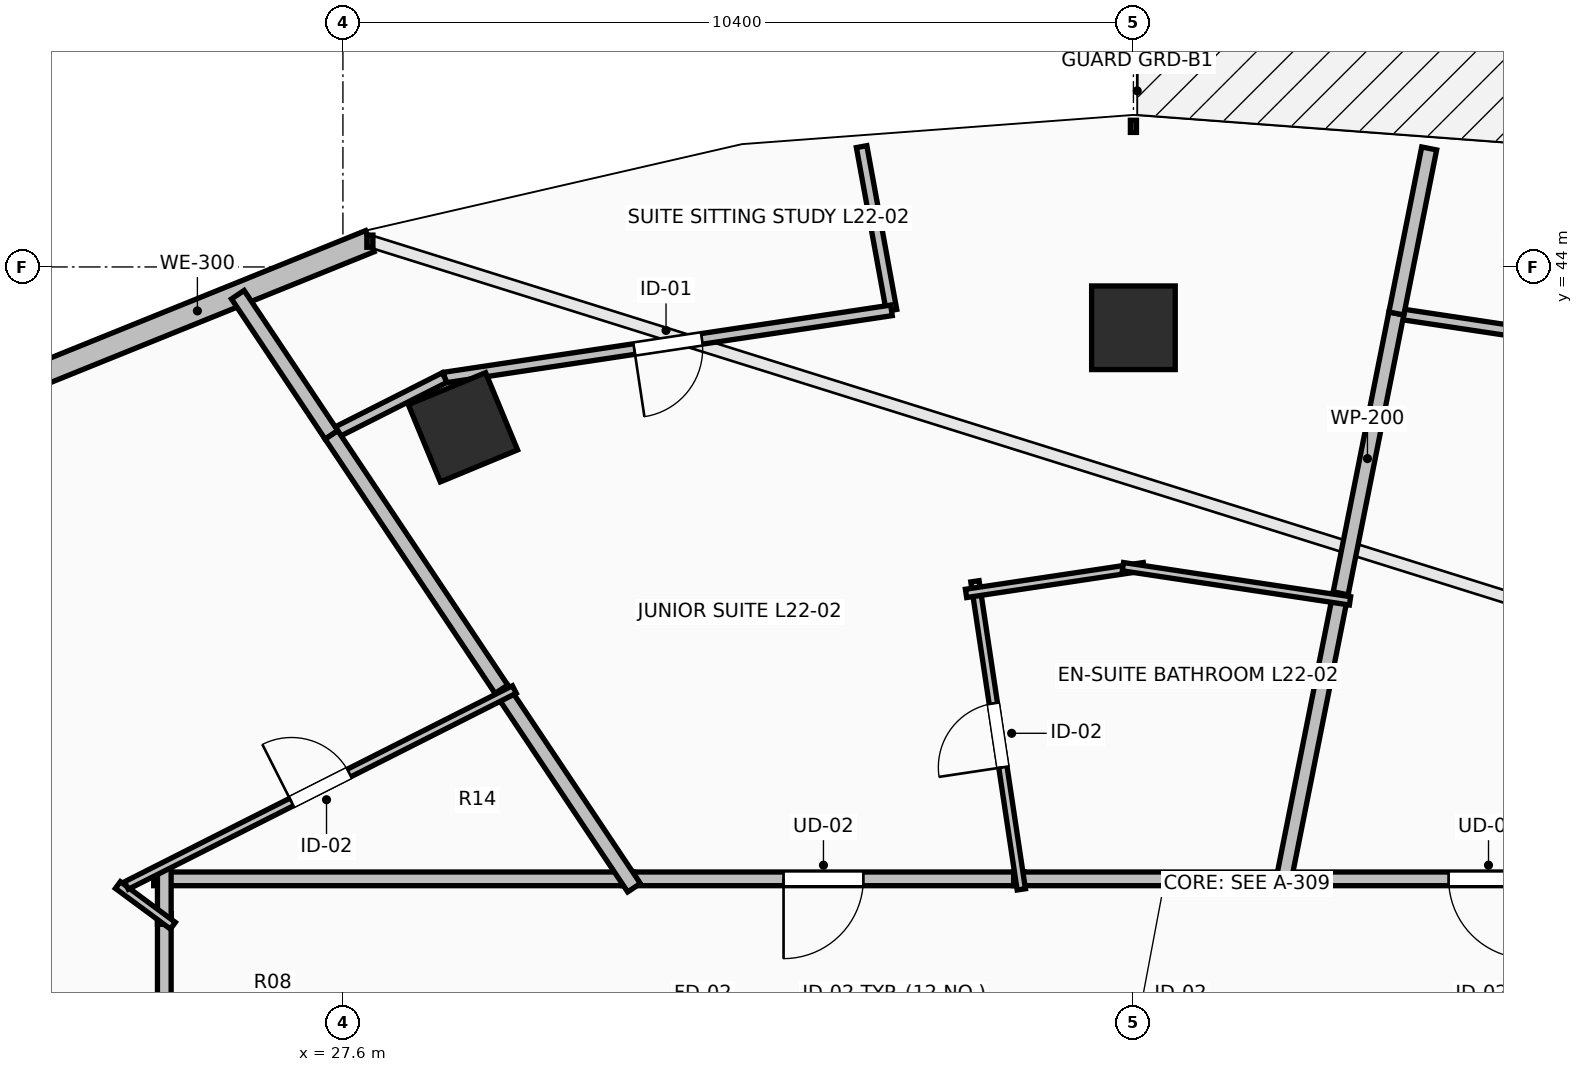
"""IFC4 building model, lengths in metres.
Left out: names, types, materials, properties, quantities, classifications, styles, units other than length and angle.
Written with IfcOpenShell. Run it as: python <this file> out.ifc"""

import sys

from ifc_helpers import new_model, si_unit, direction, frame, frame_2d, origin, origin_2d, place, context, subcontext, project, spatial, rectangle, extrude, element, fill, save


model = new_model("IFC4")
c1 = context("Model", 3, precision=1e-05, world=origin(), true_north=direction((0.0, 1.0)))
c2 = subcontext(c1, "Body", "Model", "MODEL_VIEW")
j1 = project(units=[si_unit("LENGTHUNIT", "METRE"), si_unit("PLANEANGLEUNIT", "RADIAN")], contexts=[c1])
p1 = place(None, origin())
s1 = spatial("IfcSite", under=j1, at=p1, CompositionType="ELEMENT")
p2 = place(p1, origin())
s2 = spatial("IfcBuilding", under=s1, at=p2, CompositionType="ELEMENT")
p3 = place(p2, frame((0.0, 0.0, 85.8)))
s3 = spatial("IfcBuildingStorey", under=s2, at=p3, CompositionType="ELEMENT", Elevation=85.8)
for number, where, z_axis, x_axis in (
    (1, (38.0, 43.2, 0.0), (0.0, 0.0, 1.0), (0.0, 1.0, 0.0)),
    (2, (29.179, 41.891, 0.0), (0.0, 0.0, 1.0), (-0.383, 0.924, 0.0)),
):
    element("IfcColumn", number, at=place(p3, frame(where, z_axis=z_axis, x_axis=x_axis)), inside=s3, PredefinedType="COLUMN", context=c2, shape_type="SweptSolid", body=[
        extrude(rectangle(XDim=1.1, YDim=1.1, at=origin_2d()), origin(), (0.0, 0.0, 1.0), 3.5),
    ])
p4 = place(p3, frame((27.955, 44.339, 0.0), z_axis=(0.0, 0.0, 1.0), x_axis=(-0.927122233109, -0.374759075775, 0.0)))
e3 = element("IfcWall", 3, at=p4, inside=s3, PredefinedType="STANDARD", context=c2, shape_type="SweptSolid", body=[
    extrude(rectangle(XDim=4.895, YDim=0.3, at=frame_2d((2.448, 0.0))), origin(), (0.0, 0.0, 1.0), 3.24),
])
p5 = place(p3, frame((45.424, 35.95, 0.0), z_axis=(0.0, 0.0, 1.0), x_axis=(-1.0, 0.0, 0.0)))
e4 = element("IfcWall", 4, at=p5, inside=s3, PredefinedType="PARTITIONING", context=c2, shape_type="SweptSolid", body=[
    extrude(rectangle(XDim=5.505, YDim=0.18, at=frame_2d((2.752, 0.0))), origin(), (0.0, 0.0, 1.0), 2.922),
])
p6 = place(p5, frame((2.228, 0.0, 0.0)))
e5 = element("IfcOpeningElement", 5, at=p6, cuts=e4, PredefinedType="OPENING", context=c2, shape_type="SweptSolid", body=[
    extrude(rectangle(XDim=1.05, YDim=2.2, at=frame_2d((0.525, 1.1))), frame((0.0, 0.105, 0.0), z_axis=(0.0, -1.0, 0.0), x_axis=(1.0, 0.0, 0.0)), (0.0, 0.0, 1.0), 0.21),
])
p7 = place(p3, frame((36.564, 35.95, 0.0), z_axis=(0.0, 0.0, 1.0), x_axis=(-1.0, 0.0, 0.0)))
e6 = element("IfcWall", 6, at=p7, inside=s3, PredefinedType="PARTITIONING", context=c2, shape_type="SweptSolid", body=[
    extrude(rectangle(XDim=5.284, YDim=0.18, at=frame_2d((2.642, 0.0))), origin(), (0.0, 0.0, 1.0), 3.24),
])
p8 = place(p7, frame((2.117, 0.0, 0.0)))
e7 = element("IfcOpeningElement", 7, at=p8, cuts=e6, PredefinedType="OPENING", context=c2, shape_type="SweptSolid", body=[
    extrude(rectangle(XDim=1.05, YDim=2.2, at=frame_2d((0.525, 1.1))), frame((0.0, 0.105, 0.0), z_axis=(0.0, -1.0, 0.0), x_axis=(1.0, 0.0, 0.0)), (0.0, 0.0, 1.0), 0.21),
])
p9 = place(p3, frame((40.059, 35.95, 0.0), z_axis=(0.0, 0.0, 1.0), x_axis=(-1.0, 0.0, 0.0)))
e8 = element("IfcWall", 8, at=p9, inside=s3, PredefinedType="PARTITIONING", context=c2, shape_type="SweptSolid", body=[
    extrude(rectangle(XDim=3.635, YDim=0.18, at=frame_2d((1.817, 0.0))), origin(), (0.0, 0.0, 1.0), 3.24),
])
p10 = place(p3, frame((25.25, 35.492, 0.0), z_axis=(0.0, 0.0, 1.0), x_axis=(0.0, -1.0, 0.0)))
e9 = element("IfcWall", 9, at=p10, inside=s3, PredefinedType="PARTITIONING", context=c2, shape_type="SweptSolid", body=[
    extrude(rectangle(XDim=7.016, YDim=0.18, at=frame_2d((3.508, 0.0))), origin(), (0.0, 0.0, 1.0), 2.432),
])
p11 = place(p10, frame((2.983, 0.0, 0.0)))
e10 = element("IfcOpeningElement", 10, at=p11, cuts=e9, PredefinedType="OPENING", context=c2, shape_type="SweptSolid", body=[
    extrude(rectangle(XDim=1.05, YDim=2.2, at=frame_2d((0.525, 1.1))), frame((0.0, 0.105, 0.0), z_axis=(0.0, -1.0, 0.0), x_axis=(1.0, 0.0, 0.0)), (0.0, 0.0, 1.0), 0.21),
])
p12 = place(p3, frame((31.42, 35.95, 0.0), z_axis=(0.0, 0.0, 1.0), x_axis=(-1.0, 0.0, 0.0)))
e11 = element("IfcWall", 11, at=p12, inside=s3, PredefinedType="PARTITIONING", context=c2, shape_type="SweptSolid", body=[
    extrude(rectangle(XDim=6.31, YDim=0.18, at=frame_2d((3.155, 0.0))), origin(), (0.0, 0.0, 1.0), 2.432),
])
p13 = place(p3, frame((25.25, 36.09, 0.0), z_axis=(0.0, 0.0, 1.0), x_axis=(0.0, -1.0, 0.0)))
e12 = element("IfcWall", 12, at=p13, inside=s3, PredefinedType="PARTITIONING", context=c2, shape_type="SweptSolid", body=[
    extrude(rectangle(XDim=0.738, YDim=0.18, at=frame_2d((0.369, 0.0))), origin(), (0.0, 0.0, 1.0), 3.24),
])
p14 = place(p3, frame((47.062, 42.545, 0.0), z_axis=(0.0, 0.0, 1.0), x_axis=(-0.988869883596, 0.148782906669, 0.0)))
e13 = element("IfcWall", 13, at=p14, inside=s3, PredefinedType="PARTITIONING", context=c2, shape_type="SweptSolid", body=[
    extrude(rectangle(XDim=5.666, YDim=0.14, at=frame_2d((2.833, 0.0))), origin(), (0.0, 0.0, 1.0), 3.24),
])
p15 = place(p14, frame((2.383, 0.0, 0.0)))
e14 = element("IfcOpeningElement", 14, at=p15, cuts=e13, PredefinedType="OPENING", context=c2, shape_type="SweptSolid", body=[
    extrude(rectangle(XDim=0.9, YDim=2.1, at=frame_2d((0.45, 1.05))), frame((0.0, 0.085, 0.0), z_axis=(0.0, -1.0, 0.0), x_axis=(1.0, 0.0, 0.0)), (0.0, 0.0, 1.0), 0.17),
])
p16 = place(p3, frame((41.459, 43.388, 0.0), z_axis=(0.0, 0.0, 1.0), x_axis=(-0.195187593062, -0.980765926975, 0.0)))
e15 = element("IfcWall", 15, at=p16, inside=s3, PredefinedType="PARTITIONING", context=c2, shape_type="SweptSolid", body=[
    extrude(rectangle(XDim=3.894, YDim=0.2, at=frame_2d((1.947, 0.0))), origin(), (0.0, 0.0, 1.0), 2.677),
])
p17 = place(p3, frame((40.727, 39.706, 0.0), z_axis=(0.0, 0.0, 1.0), x_axis=(-0.195252736913, -0.980752960091, 0.0)))
e16 = element("IfcWall", 16, at=p17, inside=s3, PredefinedType="PARTITIONING", context=c2, shape_type="SweptSolid", body=[
    extrude(rectangle(XDim=3.97, YDim=0.2, at=frame_2d((1.985, 0.0))), origin(), (0.0, 0.0, 1.0), 2.874),
])
p18 = place(p3, frame((41.891, 45.559, 0.0), z_axis=(0.0, 0.0, 1.0), x_axis=(-0.195204079936, -0.980762645688, 0.0)))
e17 = element("IfcWall", 17, at=p18, inside=s3, PredefinedType="PARTITIONING", context=c2, shape_type="SweptSolid", body=[
    extrude(rectangle(XDim=2.214, YDim=0.2, at=frame_2d((1.107, 0.0))), origin(), (0.0, 0.0, 1.0), 3.24),
])
p19 = place(p3, frame((36.525, 35.812, 0.0), z_axis=(0.0, 0.0, 1.0), x_axis=(-0.148739497936, 0.988876413792, 0.0)))
e18 = element("IfcWall", 18, at=p19, inside=s3, PredefinedType="PARTITIONING", context=c2, shape_type="SweptSolid", body=[
    extrude(rectangle(XDim=4.099, YDim=0.11, at=frame_2d((2.049, 0.0))), origin(), (0.0, 0.0, 1.0), 2.874),
])
p20 = place(p19, frame((1.624, 0.0, 0.0)))
e19 = element("IfcOpeningElement", 19, at=p20, cuts=e18, PredefinedType="OPENING", context=c2, shape_type="SweptSolid", body=[
    extrude(rectangle(XDim=0.85, YDim=2.1, at=frame_2d((0.425, 1.05))), frame((0.0, 0.07, 0.0), z_axis=(0.0, -1.0, 0.0), x_axis=(1.0, 0.0, 0.0)), (0.0, 0.0, 1.0), 0.14),
])
p21 = place(p3, frame((35.798, 39.705, 0.0), z_axis=(0.0, 0.0, 1.0), x_axis=(0.988893947493, 0.148622880511, 0.0)))
e20 = element("IfcWall", 20, at=p21, inside=s3, PredefinedType="PARTITIONING", context=c2, shape_type="SweptSolid", body=[
    extrude(rectangle(XDim=2.367, YDim=0.11, at=frame_2d((1.184, 0.0))), origin(), (0.0, 0.0, 1.0), 2.874),
])
p22 = place(p3, frame((37.862, 40.057, 0.0), z_axis=(0.0, 0.0, 1.0), x_axis=(0.988861549405, -0.148838288446, 0.0)))
e21 = element("IfcWall", 21, at=p22, inside=s3, PredefinedType="PARTITIONING", context=c2, shape_type="SweptSolid", body=[
    extrude(rectangle(XDim=3.021, YDim=0.11, at=frame_2d((1.511, 0.0))), origin(), (0.0, 0.0, 1.0), 3.24),
])
p23 = place(p3, frame((34.424, 45.583, 0.0), z_axis=(0.0, 0.0, 1.0), x_axis=(0.179405454878, -0.983775219631, 0.0)))
e22 = element("IfcWall", 22, at=p23, inside=s3, PredefinedType="PARTITIONING", context=c2, shape_type="SweptSolid", body=[
    extrude(rectangle(XDim=2.19, YDim=0.14, at=frame_2d((1.095, 0.0))), origin(), (0.0, 0.0, 1.0), 3.24),
])
p24 = place(p3, frame((34.817, 43.429, 0.0), z_axis=(0.0, 0.0, 1.0), x_axis=(-0.988882066939, -0.14870190882, 0.0)))
e23 = element("IfcWall", 23, at=p24, inside=s3, PredefinedType="PARTITIONING", context=c2, shape_type="SweptSolid", body=[
    extrude(rectangle(XDim=5.945, YDim=0.14, at=frame_2d((2.973, 0.0))), origin(), (0.0, 0.0, 1.0), 3.24),
])
p25 = place(p24, frame((2.522, 0.0, 0.0)))
e24 = element("IfcOpeningElement", 24, at=p25, cuts=e23, PredefinedType="OPENING", context=c2, shape_type="SweptSolid", body=[
    extrude(rectangle(XDim=0.9, YDim=2.1, at=frame_2d((0.45, 1.05))), frame((0.0, 0.085, 0.0), z_axis=(0.0, -1.0, 0.0), x_axis=(1.0, 0.0, 0.0)), (0.0, 0.0, 1.0), 0.17),
])
p26 = place(p3, frame((28.938, 42.545, 0.0), z_axis=(0.0, 0.0, 1.0), x_axis=(-0.892517956507, -0.451011859392, 0.0)))
e25 = element("IfcWall", 25, at=p26, inside=s3, PredefinedType="PARTITIONING", context=c2, shape_type="SweptSolid", body=[
    extrude(rectangle(XDim=1.669, YDim=0.14, at=frame_2d((0.835, 0.0))), origin(), (0.0, 0.0, 1.0), 3.24),
])
p27 = place(p3, frame((27.448, 41.792, 0.0), z_axis=(0.0, 0.0, 1.0), x_axis=(0.555619383998, -0.831436768567, 0.0)))
e26 = element("IfcWall", 26, at=p27, inside=s3, PredefinedType="PARTITIONING", context=c2, shape_type="SweptSolid", body=[
    extrude(rectangle(XDim=4.167, YDim=0.2, at=frame_2d((2.083, 0.0))), origin(), (0.0, 0.0, 1.0), 2.432),
])
p28 = place(p3, frame((29.685, 38.444, 0.0), z_axis=(0.0, 0.0, 1.0), x_axis=(0.555596981897, -0.831451738652, 0.0)))
e27 = element("IfcWall", 27, at=p28, inside=s3, PredefinedType="PARTITIONING", context=c2, shape_type="SweptSolid", body=[
    extrude(rectangle(XDim=3.14, YDim=0.2, at=frame_2d((1.57, 0.0))), origin(), (0.0, 0.0, 1.0), 2.432),
])
p29 = place(p3, frame((26.217, 43.635, 0.0), z_axis=(0.0, 0.0, 1.0), x_axis=(0.555411777185, -0.831575467269, 0.0)))
e28 = element("IfcWall", 28, at=p29, inside=s3, PredefinedType="PARTITIONING", context=c2, shape_type="SweptSolid", body=[
    extrude(rectangle(XDim=2.216, YDim=0.2, at=frame_2d((1.108, 0.0))), origin(), (0.0, 0.0, 1.0), 3.24),
])
p30 = place(p3, frame((25.363, 35.334, 0.0), z_axis=(0.0, 0.0, 1.0), x_axis=(-0.804215638238, 0.594337620561, 0.0)))
e29 = element("IfcWall", 29, at=p30, inside=s3, PredefinedType="PARTITIONING", context=c2, shape_type="SweptSolid", body=[
    extrude(rectangle(XDim=0.899, YDim=0.11, at=frame_2d((0.45, 0.0))), origin(), (0.0, 0.0, 1.0), 2.432),
])
p31 = place(p3, frame((24.751, 35.862, 0.0), z_axis=(0.0, 0.0, 1.0), x_axis=(0.892506436774, 0.451034655339, 0.0)))
e30 = element("IfcWall", 30, at=p31, inside=s3, PredefinedType="PARTITIONING", context=c2, shape_type="SweptSolid", body=[
    extrude(rectangle(XDim=5.719, YDim=0.11, at=frame_2d((2.859, 0.0))), origin(), (0.0, 0.0, 1.0), 2.432),
])
p32 = place(p31, frame((2.434, 0.0, 0.0)))
e31 = element("IfcOpeningElement", 31, at=p32, cuts=e30, PredefinedType="OPENING", context=c2, shape_type="SweptSolid", body=[
    extrude(rectangle(XDim=0.85, YDim=2.1, at=frame_2d((0.425, 1.05))), frame((0.0, 0.07, 0.0), z_axis=(0.0, -1.0, 0.0), x_axis=(1.0, 0.0, 0.0)), (0.0, 0.0, 1.0), 0.14),
])
p33 = place(p6, origin())
e32 = element("IfcDoor", 32, at=p33, inside=s3, OperationType="SINGLE_SWING_LEFT", PredefinedType="DOOR", context=c2, shape_type="SweptSolid", body=[
    extrude(rectangle(XDim=1.05, YDim=2.2, at=frame_2d((0.525, 1.1))), frame((0.0, 0.025, 0.0), z_axis=(0.0, -1.0, 0.0), x_axis=(1.0, 0.0, 0.0)), (0.0, 0.0, 1.0), 0.05),
])
fill(e5, e32)
p34 = place(p8, origin())
e33 = element("IfcDoor", 33, at=p34, inside=s3, OperationType="SINGLE_SWING_RIGHT", PredefinedType="DOOR", context=c2, shape_type="SweptSolid", body=[
    extrude(rectangle(XDim=1.05, YDim=2.2, at=frame_2d((0.525, 1.1))), frame((0.0, 0.025, 0.0), z_axis=(0.0, -1.0, 0.0), x_axis=(1.0, 0.0, 0.0)), (0.0, 0.0, 1.0), 0.05),
])
fill(e7, e33)
p35 = place(p20, origin())
e34 = element("IfcDoor", 34, at=p35, inside=s3, OperationType="SINGLE_SWING_LEFT", PredefinedType="DOOR", context=c2, shape_type="SweptSolid", body=[
    extrude(rectangle(XDim=0.85, YDim=2.1, at=frame_2d((0.425, 1.05))), frame((0.0, 0.025, 0.0), z_axis=(0.0, -1.0, 0.0), x_axis=(1.0, 0.0, 0.0)), (0.0, 0.0, 1.0), 0.05),
])
fill(e19, e34)
p36 = place(p25, origin())
e35 = element("IfcDoor", 35, at=p36, inside=s3, OperationType="SINGLE_SWING_RIGHT", PredefinedType="DOOR", context=c2, shape_type="SweptSolid", body=[
    extrude(rectangle(XDim=0.9, YDim=2.1, at=frame_2d((0.45, 1.05))), frame((0.0, 0.025, 0.0), z_axis=(0.0, -1.0, 0.0), x_axis=(1.0, 0.0, 0.0)), (0.0, 0.0, 1.0), 0.05),
])
fill(e24, e35)
p37 = place(p32, origin())
e36 = element("IfcDoor", 36, at=p37, inside=s3, OperationType="SINGLE_SWING_LEFT", PredefinedType="DOOR", context=c2, shape_type="SweptSolid", body=[
    extrude(rectangle(XDim=0.85, YDim=2.1, at=frame_2d((0.425, 1.05))), frame((0.0, 0.025, 0.0), z_axis=(0.0, -1.0, 0.0), x_axis=(1.0, 0.0, 0.0)), (0.0, 0.0, 1.0), 0.05),
])
fill(e31, e36)
save(model, sys.argv[1])
